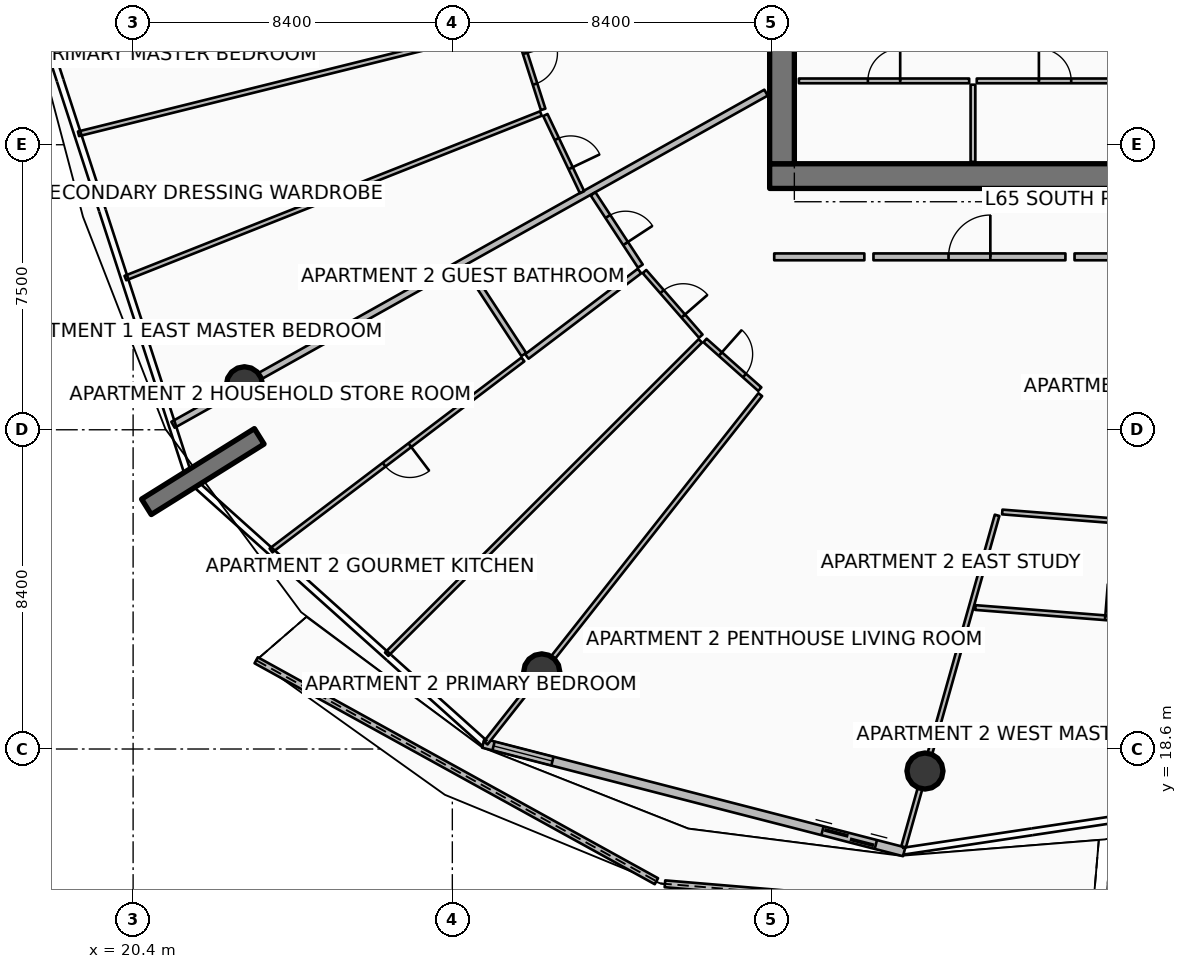
"""IFC4 building model, lengths in metres.
Left out: names, types, materials, properties, quantities, classifications, styles, units other than length and angle.
Written with IfcOpenShell. Run it as: python <this file> out.ifc"""

import sys

from ifc_helpers import new_model, si_unit, direction, frame, frame_2d, origin, origin_2d, place, context, subcontext, project, spatial, polyline, rectangle, circle, outline, extrude, element, fill, save


model = new_model("IFC4")
c1 = context("Model", 3, precision=1e-05, world=origin(), true_north=direction((0.0, 1.0)))
c2 = subcontext(c1, "Body", "Model", "MODEL_VIEW")
j1 = project(units=[si_unit("LENGTHUNIT", "METRE"), si_unit("PLANEANGLEUNIT", "RADIAN")], contexts=[c1])
p1 = place(None, origin())
s1 = spatial("IfcSite", under=j1, at=p1, CompositionType="ELEMENT")
p2 = place(p1, origin())
s2 = spatial("IfcBuilding", under=s1, at=p2, CompositionType="ELEMENT")
p3 = place(p2, frame((0.0, 0.0, 259.8)))
s3 = spatial("IfcBuildingStorey", under=s2, at=p3, CompositionType="ELEMENT", Elevation=259.8)
p4 = place(p3, frame((37.15, 33.675, 0.0), z_axis=(0.0, 0.0, 1.0), x_axis=(1.0, 0.0, 0.0)))
e1 = element("IfcWall", 1, at=p4, inside=s3, PredefinedType="SHEAR", context=c2, shape_type="SweptSolid", body=[
    extrude(rectangle(XDim=9.75, YDim=0.65, at=frame_2d((4.875, 0.0))), origin(), (0.0, 0.0, 1.0), 3.85),
])
p5 = place(p3, frame((37.475, 34.0, 0.0), z_axis=(0.0, 0.0, 1.0), x_axis=(0.0, 1.0, 0.0)))
e2 = element("IfcWall", 2, at=p5, inside=s3, PredefinedType="SHEAR", context=c2, shape_type="SweptSolid", body=[
    extrude(rectangle(XDim=16.0, YDim=0.65, at=frame_2d((8.0, 0.0))), origin(), (0.0, 0.0, 1.0), 3.85),
])
p6 = place(p3, frame((23.719, 26.827, 0.0), z_axis=(0.0, 0.0, 1.0), x_axis=(-0.848033572426, -0.529942506352, 0.0)))
e3 = element("IfcWall", 3, at=p6, inside=s3, PredefinedType="SOLIDWALL", context=c2, shape_type="SweptSolid", body=[
    extrude(rectangle(XDim=3.5, YDim=0.48, at=frame_2d((1.75, 0.0))), origin(), (0.0, 0.0, 1.0), 3.85),
])
for number, where, z_axis, x_axis in (
    (4, (23.33, 28.184, 0.0), (0.0, 0.0, 1.0), (1.0, 0.0, 0.0)),
    (5, (31.153, 20.629, 0.0), (0.0, 0.0, 1.0), (1.0, 0.0, 0.0)),
    (6, (41.237, 18.021, 0.0), (0.0, 0.0, 1.0), (1.0, 0.0, 0.0)),
):
    element("IfcColumn", number, at=place(p3, frame(where, z_axis=z_axis, x_axis=x_axis)), inside=s3, PredefinedType="COLUMN", context=c2, shape_type="SweptSolid", body=[
        extrude(circle(Radius=0.475, at=origin_2d()), origin(), (0.0, 0.0, 1.0), 3.59),
    ])
p7 = place(p3, frame((23.639, 20.935, 0.0), z_axis=(0.0, 0.0, 1.0), x_axis=(0.875454216257, -0.483301060663, 0.0)))
e7 = element("IfcWall", 7, at=p7, inside=s3, PredefinedType="PARAPET", context=c2, shape_type="SweptSolid", body=[
    extrude(outline(polyline([(0.0, 0.0), (12.029, 0.0), (12.029, 1.148), (6.015, 1.127), (0.0, 1.224), (0.0, 0.0)])), frame((0.0, 0.09, 0.0), z_axis=(0.0, -1.0, 0.0), x_axis=(1.0, 0.0, 0.0)), (0.0, 0.0, 1.0), 0.18),
])
p8 = place(p3, frame((34.395, 15.053, 0.0), z_axis=(0.0, 0.0, 1.0), x_axis=(0.99651583667, -0.083403760507, 0.0)))
e8 = element("IfcWall", 8, at=p8, inside=s3, PredefinedType="PARAPET", context=c2, shape_type="SweptSolid", body=[
    extrude(outline(polyline([(0.0, 0.0), (11.279, 0.0), (11.278, 1.483), (5.639, 1.284), (0.0, 1.148), (0.0, 0.0)])), frame((0.0, 0.09, 0.0), z_axis=(0.0, -1.0, 0.0), x_axis=(1.0, 0.0, 0.0)), (0.0, 0.0, 1.0), 0.18),
])
p9 = place(p3, frame((45.979, 14.145, 0.0), z_axis=(0.0, 0.0, 1.0), x_axis=(0.979472745479, 0.201576637692, 0.0)))
e9 = element("IfcWall", 9, at=p9, inside=s3, PredefinedType="PARAPET", context=c2, shape_type="SweptSolid", body=[
    extrude(outline(polyline([(0.0, 0.0), (10.475, 0.0), (10.476, 1.832), (5.238, 1.696), (0.0, 1.497), (0.0, 0.0)])), frame((0.0, 0.09, 0.0), z_axis=(0.0, -1.0, 0.0), x_axis=(1.0, 0.0, 0.0)), (0.0, 0.0, 1.0), 0.18),
])
p10 = place(p3, frame((29.614, 18.751, 0.0), z_axis=(0.0, 0.0, 1.0), x_axis=(0.968343758421, -0.249620442927, 0.0)))
e10 = element("IfcWall", 10, at=p10, inside=s3, PredefinedType="SOLIDWALL", context=c2, shape_type="SweptSolid", body=[
    extrude(rectangle(XDim=11.438, YDim=0.24, at=frame_2d((5.719, 0.0))), origin(), (0.0, 0.0, 1.0), 2.54),
])
p11 = place(p10, frame((9.218, 0.0, 0.0)))
e11 = element("IfcOpeningElement", 11, at=p11, cuts=e10, PredefinedType="OPENING", context=c2, shape_type="SweptSolid", body=[
    extrude(rectangle(XDim=1.45, YDim=2.15, at=frame_2d((0.725, 1.075))), frame((0.0, 0.13, 0.0), z_axis=(0.0, -1.0, 0.0), x_axis=(1.0, 0.0, 0.0)), (0.0, 0.0, 1.0), 0.26),
])
p12 = place(p10, frame((0.28, 0.0, 0.65)))
e12 = element("IfcOpeningElement", 12, at=p12, cuts=e10, PredefinedType="OPENING", context=c2, shape_type="SweptSolid", body=[
    extrude(rectangle(XDim=1.6, YDim=1.5, at=frame_2d((0.8, 0.75))), frame((0.0, 0.13, 0.0), z_axis=(0.0, -1.0, 0.0), x_axis=(1.0, 0.0, 0.0)), (0.0, 0.0, 1.0), 0.26),
])
p13 = place(p3, frame((42.5, 34.05, 0.0), z_axis=(0.0, 0.0, 1.0), x_axis=(0.0, 1.0, 0.0)))
e13 = element("IfcWall", 13, at=p13, inside=s3, PredefinedType="PARTITIONING", context=c2, shape_type="SweptSolid", body=[
    extrude(rectangle(XDim=2.03, YDim=0.125, at=frame_2d((1.015, 0.0))), origin(), (0.0, 0.0, 1.0), 3.03),
])
p14 = place(p3, frame((37.92, 36.18, 0.0), z_axis=(0.0, 0.0, 1.0), x_axis=(1.0, 0.0, 0.0)))
e14 = element("IfcWall", 14, at=p14, inside=s3, PredefinedType="PARTITIONING", context=c2, shape_type="SweptSolid", body=[
    extrude(rectangle(XDim=4.48, YDim=0.125, at=frame_2d((2.24, 0.0))), origin(), (0.0, 0.0, 1.0), 3.03),
])
p15 = place(p14, frame((1.815, 0.0, 0.0)))
e15 = element("IfcOpeningElement", 15, at=p15, cuts=e14, PredefinedType="OPENING", context=c2, shape_type="SweptSolid", body=[
    extrude(rectangle(XDim=0.85, YDim=2.06, at=frame_2d((0.425, 1.03))), frame((0.0, 0.073, 0.0), z_axis=(0.0, -1.0, 0.0), x_axis=(1.0, 0.0, 0.0)), (0.0, 0.0, 1.0), 0.145),
])
p16 = place(p3, frame((42.6, 36.18, 0.0), z_axis=(0.0, 0.0, 1.0), x_axis=(1.0, 0.0, 0.0)))
e16 = element("IfcWall", 16, at=p16, inside=s3, PredefinedType="PARTITIONING", context=c2, shape_type="SweptSolid", body=[
    extrude(rectangle(XDim=4.12, YDim=0.125, at=frame_2d((2.06, 0.0))), origin(), (0.0, 0.0, 1.0), 3.03),
])
p17 = place(p16, frame((1.635, 0.0, 0.0)))
e17 = element("IfcOpeningElement", 17, at=p17, cuts=e16, PredefinedType="OPENING", context=c2, shape_type="SweptSolid", body=[
    extrude(rectangle(XDim=0.85, YDim=2.06, at=frame_2d((0.425, 1.03))), frame((0.0, 0.073, 0.0), z_axis=(0.0, -1.0, 0.0), x_axis=(1.0, 0.0, 0.0)), (0.0, 0.0, 1.0), 0.145),
])
p18 = place(p3, frame((37.054, 35.87, 0.0), z_axis=(0.0, 0.0, 1.0), x_axis=(-0.872490186067, -0.488631635506, 0.0)))
e18 = element("IfcWall", 18, at=p18, inside=s3, PredefinedType="PARTITIONING", context=c2, shape_type="SweptSolid", body=[
    extrude(rectangle(XDim=17.884, YDim=0.18, at=frame_2d((8.942, 0.0))), origin(), (0.0, 0.0, 1.0), 2.957),
])
p19 = place(p3, frame((30.391, 37.626, 0.0), z_axis=(0.0, 0.0, 1.0), x_axis=(-0.970503640625, -0.24108646485, 0.0)))
e19 = element("IfcWall", 19, at=p19, inside=s3, PredefinedType="PARTITIONING", context=c2, shape_type="SweptSolid", body=[
    extrude(rectangle(XDim=11.775, YDim=0.125, at=frame_2d((5.888, 0.0))), origin(), (0.0, 0.0, 1.0), 3.03),
])
p20 = place(p3, frame((31.13, 35.321, 0.0), z_axis=(0.0, 0.0, 1.0), x_axis=(-0.929773898428, -0.368131087796, 0.0)))
e20 = element("IfcWall", 20, at=p20, inside=s3, PredefinedType="PARTITIONING", context=c2, shape_type="SweptSolid", body=[
    extrude(rectangle(XDim=11.76, YDim=0.125, at=frame_2d((5.88, 0.0))), origin(), (0.0, 0.0, 1.0), 3.03),
])
p21 = place(p3, frame((30.503, 37.571, 0.0), z_axis=(0.0, 0.0, 1.0), x_axis=(0.305327243998, -0.952247485727, 0.0)))
e21 = element("IfcWall", 21, at=p21, inside=s3, PredefinedType="PARTITIONING", context=c2, shape_type="SweptSolid", body=[
    extrude(rectangle(XDim=2.249, YDim=0.125, at=frame_2d((1.124, 0.0))), origin(), (0.0, 0.0, 1.0), 3.03),
])
p22 = place(p21, frame((0.699, 0.0, 0.0)))
e22 = element("IfcOpeningElement", 22, at=p22, cuts=e21, PredefinedType="OPENING", context=c2, shape_type="SweptSolid", body=[
    extrude(rectangle(XDim=0.85, YDim=2.06, at=frame_2d((0.425, 1.03))), frame((0.0, 0.073, 0.0), z_axis=(0.0, -1.0, 0.0), x_axis=(1.0, 0.0, 0.0)), (0.0, 0.0, 1.0), 0.145),
])
p23 = place(p3, frame((31.248, 35.281, 0.0), z_axis=(0.0, 0.0, 1.0), x_axis=(0.429406696771, -0.903111227241, 0.0)))
e23 = element("IfcWall", 23, at=p23, inside=s3, PredefinedType="PARTITIONING", context=c2, shape_type="SweptSolid", body=[
    extrude(rectangle(XDim=2.249, YDim=0.125, at=frame_2d((1.124, 0.0))), origin(), (0.0, 0.0, 1.0), 2.957),
])
p24 = place(p23, frame((0.699, 0.0, 0.0)))
e24 = element("IfcOpeningElement", 24, at=p24, cuts=e23, PredefinedType="OPENING", context=c2, shape_type="SweptSolid", body=[
    extrude(rectangle(XDim=0.85, YDim=2.06, at=frame_2d((0.425, 1.03))), frame((0.0, 0.073, 0.0), z_axis=(0.0, -1.0, 0.0), x_axis=(1.0, 0.0, 0.0)), (0.0, 0.0, 1.0), 0.145),
])
p25 = place(p3, frame((39.882, 31.55, 0.0), z_axis=(0.0, 0.0, 1.0), x_axis=(1.0, 0.0, 0.0)))
e25 = element("IfcWall", 25, at=p25, inside=s3, PredefinedType="PARTITIONING", context=c2, shape_type="SweptSolid", body=[
    extrude(rectangle(XDim=5.051, YDim=0.18, at=frame_2d((2.525, 0.0))), origin(), (0.0, 0.0, 1.0), 2.957),
])
p26 = place(p25, frame((1.975, 0.0, 0.0)))
e26 = element("IfcOpeningElement", 26, at=p26, cuts=e25, PredefinedType="OPENING", context=c2, shape_type="SweptSolid", body=[
    extrude(rectangle(XDim=1.1, YDim=2.1, at=frame_2d((0.55, 1.05))), frame((0.0, 0.1, 0.0), z_axis=(0.0, -1.0, 0.0), x_axis=(1.0, 0.0, 0.0)), (0.0, 0.0, 1.0), 0.2),
])
p27 = place(p3, frame((37.27, 31.55, 0.0), z_axis=(0.0, 0.0, 1.0), x_axis=(1.0, 0.0, 0.0)))
e27 = element("IfcWall", 27, at=p27, inside=s3, PredefinedType="PARTITIONING", context=c2, shape_type="SweptSolid", body=[
    extrude(rectangle(XDim=2.372, YDim=0.18, at=frame_2d((1.186, 0.0))), origin(), (0.0, 0.0, 1.0), 2.957),
])
p28 = place(p3, frame((36.903, 27.924, 0.0), z_axis=(0.0, 0.0, 1.0), x_axis=(-0.619090039254, -0.785320013304, 0.0)))
e28 = element("IfcWall", 28, at=p28, inside=s3, PredefinedType="PARTITIONING", context=c2, shape_type="SweptSolid", body=[
    extrude(rectangle(XDim=11.672, YDim=0.125, at=frame_2d((5.836, 0.0))), origin(), (0.0, 0.0, 1.0), 2.957),
])
p29 = place(p3, frame((32.503, 33.207, 0.0), z_axis=(0.0, 0.0, 1.0), x_axis=(0.54776176335, -0.836634358972, 0.0)))
e29 = element("IfcWall", 29, at=p29, inside=s3, PredefinedType="PARTITIONING", context=c2, shape_type="SweptSolid", body=[
    extrude(rectangle(XDim=2.272, YDim=0.15, at=frame_2d((1.136, 0.0))), origin(), (0.0, 0.0, 1.0), 2.957),
])
p30 = place(p29, frame((0.711, 0.0, 0.0)))
e30 = element("IfcOpeningElement", 30, at=p30, cuts=e29, PredefinedType="OPENING", context=c2, shape_type="SweptSolid", body=[
    extrude(rectangle(XDim=0.85, YDim=2.06, at=frame_2d((0.425, 1.03))), frame((0.0, 0.085, 0.0), z_axis=(0.0, -1.0, 0.0), x_axis=(1.0, 0.0, 0.0)), (0.0, 0.0, 1.0), 0.17),
])
p31 = place(p3, frame((29.144, 31.326, 0.0), z_axis=(0.0, 0.0, 1.0), x_axis=(0.547727893033, -0.836656533587, 0.0)))
e31 = element("IfcWall", 31, at=p31, inside=s3, PredefinedType="PARTITIONING", context=c2, shape_type="SweptSolid", body=[
    extrude(rectangle(XDim=2.804, YDim=0.15, at=frame_2d((1.402, 0.0))), origin(), (0.0, 0.0, 1.0), 2.957),
])
p32 = place(p3, frame((33.725, 31.177, 0.0), z_axis=(0.0, 0.0, 1.0), x_axis=(-0.796854692537, -0.604171001441, 0.0)))
e32 = element("IfcWall", 32, at=p32, inside=s3, PredefinedType="PARTITIONING", context=c2, shape_type="SweptSolid", body=[
    extrude(rectangle(XDim=3.72, YDim=0.15, at=frame_2d((1.86, 0.0))), origin(), (0.0, 0.0, 1.0), 3.03),
])
p33 = place(p3, frame((30.657, 28.851, 0.0), z_axis=(0.0, 0.0, 1.0), x_axis=(-0.796843780875, -0.604185392807, 0.0)))
e33 = element("IfcWall", 33, at=p33, inside=s3, PredefinedType="PARTITIONING", context=c2, shape_type="SweptSolid", body=[
    extrude(rectangle(XDim=8.318, YDim=0.125, at=frame_2d((4.159, 0.0))), origin(), (0.0, 0.0, 1.0), 3.03),
])
p34 = place(p33, frame((3.734, 0.0, 0.0)))
e34 = element("IfcOpeningElement", 34, at=p34, cuts=e33, PredefinedType="OPENING", context=c2, shape_type="SweptSolid", body=[
    extrude(rectangle(XDim=0.85, YDim=2.06, at=frame_2d((0.425, 1.03))), frame((0.0, 0.073, 0.0), z_axis=(0.0, -1.0, 0.0), x_axis=(1.0, 0.0, 0.0)), (0.0, 0.0, 1.0), 0.145),
])
p35 = place(p3, frame((35.326, 29.34, 0.0), z_axis=(0.0, 0.0, 1.0), x_axis=(-0.707472916484, -0.706740456208, 0.0)))
e35 = element("IfcWall", 35, at=p35, inside=s3, PredefinedType="PARTITIONING", context=c2, shape_type="SweptSolid", body=[
    extrude(rectangle(XDim=11.666, YDim=0.125, at=frame_2d((5.833, 0.0))), origin(), (0.0, 0.0, 1.0), 3.03),
])
p36 = place(p3, frame((33.856, 31.163, 0.0), z_axis=(0.0, 0.0, 1.0), x_axis=(0.656985315096, -0.753903372952, 0.0)))
e36 = element("IfcWall", 36, at=p36, inside=s3, PredefinedType="PARTITIONING", context=c2, shape_type="SweptSolid", body=[
    extrude(rectangle(XDim=2.255, YDim=0.125, at=frame_2d((1.127, 0.0))), origin(), (0.0, 0.0, 1.0), 3.03),
])
p37 = place(p36, frame((0.702, 0.0, 0.0)))
e37 = element("IfcOpeningElement", 37, at=p37, cuts=e36, PredefinedType="OPENING", context=c2, shape_type="SweptSolid", body=[
    extrude(rectangle(XDim=0.85, YDim=2.06, at=frame_2d((0.425, 1.03))), frame((0.0, 0.073, 0.0), z_axis=(0.0, -1.0, 0.0), x_axis=(1.0, 0.0, 0.0)), (0.0, 0.0, 1.0), 0.145),
])
p38 = place(p3, frame((35.45, 29.35, 0.0), z_axis=(0.0, 0.0, 1.0), x_axis=(0.747360411924, -0.664418854857, 0.0)))
e38 = element("IfcWall", 38, at=p38, inside=s3, PredefinedType="PARTITIONING", context=c2, shape_type="SweptSolid", body=[
    extrude(rectangle(XDim=1.928, YDim=0.125, at=frame_2d((0.964, 0.0))), origin(), (0.0, 0.0, 1.0), 2.957),
])
p39 = place(p38, frame((0.539, 0.0, 0.0)))
e39 = element("IfcOpeningElement", 39, at=p39, cuts=e38, PredefinedType="OPENING", context=c2, shape_type="SweptSolid", body=[
    extrude(rectangle(XDim=0.85, YDim=2.06, at=frame_2d((0.425, 1.03))), frame((0.0, 0.073, 0.0), z_axis=(0.0, -1.0, 0.0), x_axis=(1.0, 0.0, 0.0)), (0.0, 0.0, 1.0), 0.145),
])
p40 = place(p3, frame((45.173, 31.55, 0.0), z_axis=(0.0, 0.0, 1.0), x_axis=(1.0, 0.0, 0.0)))
e40 = element("IfcWall", 40, at=p40, inside=s3, PredefinedType="PARTITIONING", context=c2, shape_type="SweptSolid", body=[
    extrude(rectangle(XDim=3.944, YDim=0.18, at=frame_2d((1.972, 0.0))), origin(), (0.0, 0.0, 1.0), 2.957),
])
p41 = place(p3, frame((43.135, 24.749, 0.0), z_axis=(0.0, 0.0, 1.0), x_axis=(-0.271445445258, -0.962453827593, 0.0)))
e41 = element("IfcWall", 41, at=p41, inside=s3, PredefinedType="PARTITIONING", context=c2, shape_type="SweptSolid", body=[
    extrude(rectangle(XDim=9.061, YDim=0.125, at=frame_2d((4.53, 0.0))), origin(), (0.0, 0.0, 1.0), 2.957),
])
p42 = place(p3, frame((43.271, 24.837, 0.0), z_axis=(0.0, 0.0, 1.0), x_axis=(0.996915339886, -0.078484425849, 0.0)))
e42 = element("IfcWall", 42, at=p42, inside=s3, PredefinedType="PARTITIONING", context=c2, shape_type="SweptSolid", body=[
    extrude(rectangle(XDim=6.735, YDim=0.125, at=frame_2d((3.367, 0.0))), origin(), (0.0, 0.0, 1.0), 2.957),
])
p43 = place(p42, frame((2.917, 0.0, 0.0)))
e43 = element("IfcOpeningElement", 43, at=p43, cuts=e42, PredefinedType="OPENING", context=c2, shape_type="SweptSolid", body=[
    extrude(rectangle(XDim=0.9, YDim=2.08, at=frame_2d((0.45, 1.04))), frame((0.0, 0.073, 0.0), z_axis=(0.0, -1.0, 0.0), x_axis=(1.0, 0.0, 0.0)), (0.0, 0.0, 1.0), 0.145),
])
p44 = place(p3, frame((42.562, 22.323, 0.0), z_axis=(0.0, 0.0, 1.0), x_axis=(0.996916778928, -0.078466144881, 0.0)))
e44 = element("IfcWall", 44, at=p44, inside=s3, PredefinedType="PARTITIONING", context=c2, shape_type="SweptSolid", body=[
    extrude(rectangle(XDim=7.754, YDim=0.125, at=frame_2d((3.877, 0.0))), origin(), (0.0, 0.0, 1.0), 2.957),
])
p45 = place(p44, frame((3.427, 0.0, 0.0)))
e45 = element("IfcOpeningElement", 45, at=p45, cuts=e44, PredefinedType="OPENING", context=c2, shape_type="SweptSolid", body=[
    extrude(rectangle(XDim=0.9, YDim=2.08, at=frame_2d((0.45, 1.04))), frame((0.0, 0.073, 0.0), z_axis=(0.0, -1.0, 0.0), x_axis=(1.0, 0.0, 0.0)), (0.0, 0.0, 1.0), 0.145),
])
p46 = place(p11, origin())
e46 = element("IfcDoor", 46, at=p46, inside=s3, OperationType="DOUBLE_DOOR_SLIDING", PredefinedType="DOOR", context=c2, shape_type="SweptSolid", body=[
    extrude(rectangle(XDim=1.45, YDim=2.15, at=frame_2d((0.725, 1.075))), frame((0.0, 0.025, 0.0), z_axis=(0.0, -1.0, 0.0), x_axis=(1.0, 0.0, 0.0)), (0.0, 0.0, 1.0), 0.05),
])
fill(e11, e46)
p47 = place(p12, origin())
e47 = element("IfcWindow", 47, at=p47, inside=s3, PartitioningType="SINGLE_PANEL", PredefinedType="WINDOW", context=c2, shape_type="SweptSolid", body=[
    extrude(rectangle(XDim=1.6, YDim=1.5, at=frame_2d((0.8, 0.75))), frame((0.0, 0.03, 0.0), z_axis=(0.0, -1.0, 0.0), x_axis=(1.0, 0.0, 0.0)), (0.0, 0.0, 1.0), 0.06),
])
fill(e12, e47)
p48 = place(p15, origin())
e48 = element("IfcDoor", 48, at=p48, inside=s3, OperationType="SINGLE_SWING_RIGHT", PredefinedType="DOOR", context=c2, shape_type="SweptSolid", body=[
    extrude(rectangle(XDim=0.85, YDim=2.06, at=frame_2d((0.425, 1.03))), frame((0.0, 0.025, 0.0), z_axis=(0.0, -1.0, 0.0), x_axis=(1.0, 0.0, 0.0)), (0.0, 0.0, 1.0), 0.05),
])
fill(e15, e48)
p49 = place(p17, origin())
e49 = element("IfcDoor", 49, at=p49, inside=s3, OperationType="SINGLE_SWING_LEFT", PredefinedType="DOOR", context=c2, shape_type="SweptSolid", body=[
    extrude(rectangle(XDim=0.85, YDim=2.06, at=frame_2d((0.425, 1.03))), frame((0.0, 0.025, 0.0), z_axis=(0.0, -1.0, 0.0), x_axis=(1.0, 0.0, 0.0)), (0.0, 0.0, 1.0), 0.05),
])
fill(e17, e49)
p50 = place(p22, origin())
e50 = element("IfcDoor", 50, at=p50, inside=s3, OperationType="SINGLE_SWING_LEFT", PredefinedType="DOOR", context=c2, shape_type="SweptSolid", body=[
    extrude(rectangle(XDim=0.85, YDim=2.06, at=frame_2d((0.425, 1.03))), frame((0.0, 0.025, 0.0), z_axis=(0.0, -1.0, 0.0), x_axis=(1.0, 0.0, 0.0)), (0.0, 0.0, 1.0), 0.05),
])
fill(e22, e50)
p51 = place(p24, origin())
e51 = element("IfcDoor", 51, at=p51, inside=s3, OperationType="SINGLE_SWING_RIGHT", PredefinedType="DOOR", context=c2, shape_type="SweptSolid", body=[
    extrude(rectangle(XDim=0.85, YDim=2.06, at=frame_2d((0.425, 1.03))), frame((0.0, 0.025, 0.0), z_axis=(0.0, -1.0, 0.0), x_axis=(1.0, 0.0, 0.0)), (0.0, 0.0, 1.0), 0.05),
])
fill(e24, e51)
p52 = place(p26, origin())
e52 = element("IfcDoor", 52, at=p52, inside=s3, OperationType="SINGLE_SWING_RIGHT", PredefinedType="DOOR", context=c2, shape_type="SweptSolid", body=[
    extrude(rectangle(XDim=1.1, YDim=2.1, at=frame_2d((0.55, 1.05))), frame((0.0, 0.025, 0.0), z_axis=(0.0, -1.0, 0.0), x_axis=(1.0, 0.0, 0.0)), (0.0, 0.0, 1.0), 0.05),
])
fill(e26, e52)
p53 = place(p30, origin())
e53 = element("IfcDoor", 53, at=p53, inside=s3, OperationType="SINGLE_SWING_RIGHT", PredefinedType="DOOR", context=c2, shape_type="SweptSolid", body=[
    extrude(rectangle(XDim=0.85, YDim=2.06, at=frame_2d((0.425, 1.03))), frame((0.0, 0.025, 0.0), z_axis=(0.0, -1.0, 0.0), x_axis=(1.0, 0.0, 0.0)), (0.0, 0.0, 1.0), 0.05),
])
fill(e30, e53)
p54 = place(p34, origin())
e54 = element("IfcDoor", 54, at=p54, inside=s3, OperationType="SINGLE_SWING_LEFT", PredefinedType="DOOR", context=c2, shape_type="SweptSolid", body=[
    extrude(rectangle(XDim=0.85, YDim=2.06, at=frame_2d((0.425, 1.03))), frame((0.0, 0.025, 0.0), z_axis=(0.0, -1.0, 0.0), x_axis=(1.0, 0.0, 0.0)), (0.0, 0.0, 1.0), 0.05),
])
fill(e34, e54)
p55 = place(p37, origin())
e55 = element("IfcDoor", 55, at=p55, inside=s3, OperationType="SINGLE_SWING_RIGHT", PredefinedType="DOOR", context=c2, shape_type="SweptSolid", body=[
    extrude(rectangle(XDim=0.85, YDim=2.06, at=frame_2d((0.425, 1.03))), frame((0.0, 0.025, 0.0), z_axis=(0.0, -1.0, 0.0), x_axis=(1.0, 0.0, 0.0)), (0.0, 0.0, 1.0), 0.05),
])
fill(e37, e55)
p56 = place(p39, origin())
e56 = element("IfcDoor", 56, at=p56, inside=s3, OperationType="SINGLE_SWING_LEFT", PredefinedType="DOOR", context=c2, shape_type="SweptSolid", body=[
    extrude(rectangle(XDim=0.85, YDim=2.06, at=frame_2d((0.425, 1.03))), frame((0.0, 0.025, 0.0), z_axis=(0.0, -1.0, 0.0), x_axis=(1.0, 0.0, 0.0)), (0.0, 0.0, 1.0), 0.05),
])
fill(e39, e56)
p57 = place(p45, origin())
e57 = element("IfcDoor", 57, at=p57, inside=s3, OperationType="SINGLE_SWING_LEFT", PredefinedType="DOOR", context=c2, shape_type="SweptSolid", body=[
    extrude(rectangle(XDim=0.9, YDim=2.08, at=frame_2d((0.45, 1.04))), frame((0.0, 0.025, 0.0), z_axis=(0.0, -1.0, 0.0), x_axis=(1.0, 0.0, 0.0)), (0.0, 0.0, 1.0), 0.05),
])
fill(e45, e57)
save(model, sys.argv[1])
